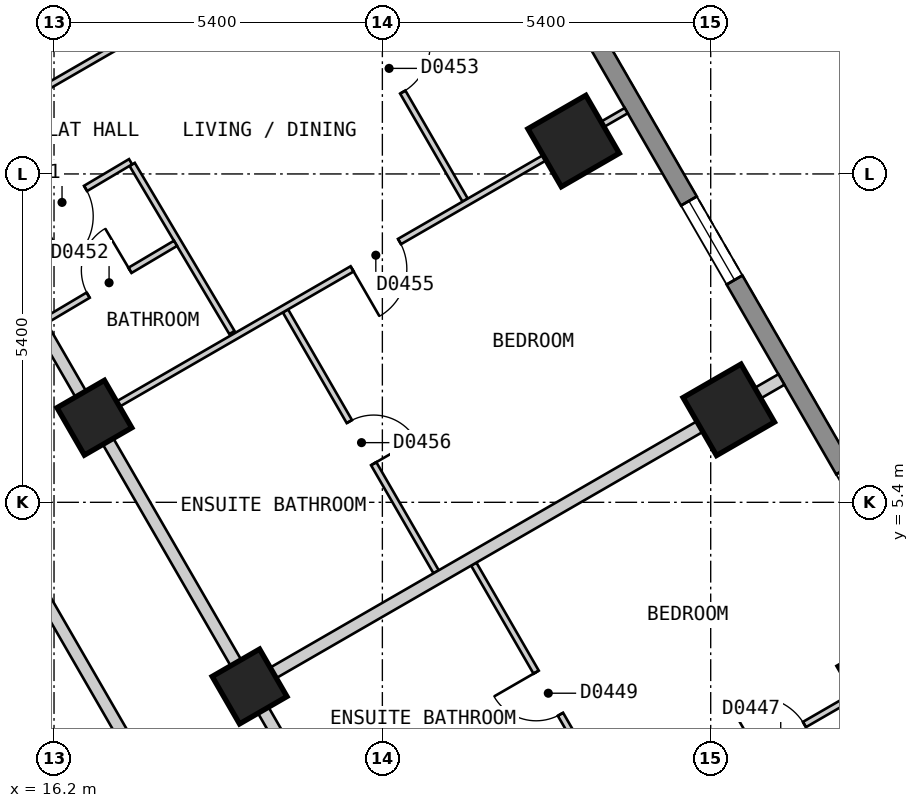
"""IFC4 building model, lengths in metres.
Left out: names, types, materials, properties, quantities, classifications, styles, units other than length and angle.
Written with IfcOpenShell. Run it as: python <this file> out.ifc"""

import sys

from ifc_helpers import new_model, si_unit, direction, frame, frame_2d, origin, origin_2d, place, context, subcontext, project, spatial, polyline, rectangle, outline, extrude, element, fill, save


model = new_model("IFC4")
c1 = context("Model", 3, precision=1e-05, world=origin(), true_north=direction((0.0, 1.0)))
c2 = subcontext(c1, "Body", "Model", "MODEL_VIEW")
j1 = project(units=[si_unit("LENGTHUNIT", "METRE"), si_unit("PLANEANGLEUNIT", "RADIAN")], contexts=[c1])
p1 = place(None, origin())
s1 = spatial("IfcSite", under=j1, at=p1, CompositionType="ELEMENT")
p2 = place(p1, origin())
s2 = spatial("IfcBuilding", under=s1, at=p2, CompositionType="ELEMENT")
p3 = place(p2, frame((0.0, 0.0, 38.4)))
s3 = spatial("IfcBuildingStorey", under=s2, at=p3, CompositionType="ELEMENT", Elevation=38.4)
for number, where, z_axis, x_axis in (
    (1, (29.848, 2.5, 0.0), (0.0, 0.0, 1.0), (-0.5, 0.866, 0.0)),
    (2, (27.297, 6.921, 0.0), (0.0, 0.0, 1.0), (-0.5, 0.866, 0.0)),
    (3, (24.745, 11.341, 0.0), (0.0, 0.0, 1.0), (-0.5, 0.866, 0.0)),
):
    element("IfcColumn", number, at=place(p3, frame(where, z_axis=z_axis, x_axis=x_axis)), inside=s3, PredefinedType="COLUMN", context=c2, shape_type="SweptSolid", body=[
        extrude(rectangle(XDim=1.1, YDim=1.1, at=origin_2d()), origin(), (0.0, 0.0, 1.0), 3.0),
    ])
for number, where, z_axis, x_axis in (
    (4, (19.416, 2.371, 0.0), (0.0, 0.0, 1.0), (-0.5, 0.866, 0.0)),
    (5, (16.864, 6.791, 0.0), (0.0, 0.0, 1.0), (-0.5, 0.866, 0.0)),
):
    element("IfcColumn", number, at=place(p3, frame(where, z_axis=z_axis, x_axis=x_axis)), inside=s3, PredefinedType="COLUMN", context=c2, shape_type="SweptSolid", body=[
        extrude(rectangle(XDim=0.9, YDim=0.9, at=origin_2d()), origin(), (0.0, 0.0, 1.0), 3.0),
    ])
p4 = place(p3, frame((31.22, 2.425, 0.0), z_axis=(0.0, 0.0, 1.0), x_axis=(-0.500001938803, 0.866024284413, 0.0)))
e6 = element("IfcWall", 6, at=p4, inside=s3, PredefinedType="SOLIDWALL", context=c2, shape_type="SweptSolid", body=[
    extrude(outline(polyline([(0.0, -0.15), (27.02, -0.15), (26.94, 0.15), (0.08, 0.15), (0.0, -0.15)])), origin(), (0.0, 0.0, 1.0), 2.7),
])
p5 = place(p4, frame((2.553, 0.0, 0.15)))
e7 = element("IfcOpeningElement", 7, at=p5, cuts=e6, PredefinedType="OPENING", context=c2, shape_type="SweptSolid", body=[
    extrude(rectangle(XDim=1.5, YDim=2.1, at=frame_2d((0.75, 1.05))), frame((0.0, 0.16, 0.0), z_axis=(0.0, -1.0, 0.0), x_axis=(1.0, 0.0, 0.0)), (0.0, 0.0, 1.0), 0.32),
])
p6 = place(p4, frame((7.657, 0.0, 0.15)))
e8 = element("IfcOpeningElement", 8, at=p6, cuts=e6, PredefinedType="OPENING", context=c2, shape_type="SweptSolid", body=[
    extrude(rectangle(XDim=1.5, YDim=2.1, at=frame_2d((0.75, 1.05))), frame((0.0, 0.16, 0.0), z_axis=(0.0, -1.0, 0.0), x_axis=(1.0, 0.0, 0.0)), (0.0, 0.0, 1.0), 0.32),
])
p7 = place(p4, frame((12.761, 0.0, 0.15)))
e9 = element("IfcOpeningElement", 9, at=p7, cuts=e6, PredefinedType="OPENING", context=c2, shape_type="SweptSolid", body=[
    extrude(rectangle(XDim=1.5, YDim=2.1, at=frame_2d((0.75, 1.05))), frame((0.0, 0.16, 0.0), z_axis=(0.0, -1.0, 0.0), x_axis=(1.0, 0.0, 0.0)), (0.0, 0.0, 1.0), 0.32),
])
p8 = place(p4, frame((17.865, 0.0, 0.15)))
e10 = element("IfcOpeningElement", 10, at=p8, cuts=e6, PredefinedType="OPENING", context=c2, shape_type="SweptSolid", body=[
    extrude(rectangle(XDim=1.5, YDim=2.1, at=frame_2d((0.75, 1.05))), frame((0.0, 0.16, 0.0), z_axis=(0.0, -1.0, 0.0), x_axis=(1.0, 0.0, 0.0)), (0.0, 0.0, 1.0), 0.32),
])
p9 = place(p4, frame((22.969, 0.0, 0.15)))
e11 = element("IfcOpeningElement", 11, at=p9, cuts=e6, PredefinedType="OPENING", context=c2, shape_type="SweptSolid", body=[
    extrude(rectangle(XDim=1.5, YDim=2.1, at=frame_2d((0.75, 1.05))), frame((0.0, 0.16, 0.0), z_axis=(0.0, -1.0, 0.0), x_axis=(1.0, 0.0, 0.0)), (0.0, 0.0, 1.0), 0.32),
])
p10 = place(p3, frame((9.18, 15.7, 0.0), z_axis=(0.0, 0.0, 1.0), x_axis=(0.500003652032, -0.866023295272, 0.0)))
e12 = element("IfcWall", 12, at=p10, inside=s3, PredefinedType="PARTITIONING", context=c2, shape_type="SweptSolid", body=[
    extrude(rectangle(XDim=18.012, YDim=0.2, at=frame_2d((9.006, 0.0))), origin(), (0.0, 0.0, 1.0), 2.7),
])
p11 = place(p10, frame((8.556, 0.0, 0.0)))
e13 = element("IfcOpeningElement", 13, at=p11, cuts=e12, PredefinedType="OPENING", context=c2, shape_type="SweptSolid", body=[
    extrude(rectangle(XDim=0.9, YDim=2.1, at=frame_2d((0.45, 1.05))), frame((0.0, 0.11, 0.0), z_axis=(0.0, -1.0, 0.0), x_axis=(1.0, 0.0, 0.0)), (0.0, 0.0, 1.0), 0.22),
])
p12 = place(p3, frame((10.45, 17.9, 0.0), z_axis=(0.0, 0.0, 1.0), x_axis=(0.500034352617, -0.866005569383, 0.0)))
e14 = element("IfcWall", 14, at=p12, inside=s3, PredefinedType="PARTITIONING", context=c2, shape_type="SweptSolid", body=[
    extrude(rectangle(XDim=20.553, YDim=0.2, at=frame_2d((10.276, 0.0))), origin(), (0.0, 0.0, 1.0), 2.7),
])
p13 = place(p12, frame((9.775, 0.0, 0.0)))
e15 = element("IfcOpeningElement", 15, at=p13, cuts=e14, PredefinedType="OPENING", context=c2, shape_type="SweptSolid", body=[
    extrude(rectangle(XDim=1.0, YDim=2.1, at=frame_2d((0.5, 1.05))), frame((0.0, 0.11, 0.0), z_axis=(0.0, -1.0, 0.0), x_axis=(1.0, 0.0, 0.0)), (0.0, 0.0, 1.0), 0.22),
])
p14 = place(p12, frame((0.852, 0.0, 0.0)))
e16 = element("IfcOpeningElement", 16, at=p14, cuts=e14, PredefinedType="OPENING", context=c2, shape_type="SweptSolid", body=[
    extrude(rectangle(XDim=0.8, YDim=2.1, at=frame_2d((0.4, 1.05))), frame((0.0, 0.11, 0.0), z_axis=(0.0, -1.0, 0.0), x_axis=(1.0, 0.0, 0.0)), (0.0, 0.0, 1.0), 0.22),
])
p15 = place(p3, frame((17.485, 10.957, 0.0), z_axis=(0.0, 0.0, 1.0), x_axis=(0.510324709283, -0.859981796956, 0.0)))
e17 = element("IfcWall", 17, at=p15, inside=s3, PredefinedType="PARTITIONING", context=c2, shape_type="SweptSolid", body=[
    extrude(rectangle(XDim=3.215, YDim=0.1, at=frame_2d((1.608, 0.0))), origin(), (0.0, 0.0, 1.0), 2.7),
])
p16 = place(p3, frame((20.006, 8.548, 0.0), z_axis=(0.0, 0.0, 1.0), x_axis=(0.500055121407, -0.865993577086, 0.0)))
e18 = element("IfcWall", 18, at=p16, inside=s3, PredefinedType="PARTITIONING", context=c2, shape_type="SweptSolid", body=[
    extrude(rectangle(XDim=4.955, YDim=0.1, at=frame_2d((2.478, 0.0))), origin(), (0.0, 0.0, 1.0), 2.7),
])
p17 = place(p16, frame((2.102, 0.0, 0.0)))
e19 = element("IfcOpeningElement", 19, at=p17, cuts=e18, PredefinedType="OPENING", context=c2, shape_type="SweptSolid", body=[
    extrude(rectangle(XDim=0.8, YDim=2.1, at=frame_2d((0.4, 1.05))), frame((0.0, 0.06, 0.0), z_axis=(0.0, -1.0, 0.0), x_axis=(1.0, 0.0, 0.0)), (0.0, 0.0, 1.0), 0.12),
])
p18 = place(p3, frame((23.103, 4.384, 0.0), z_axis=(0.0, 0.0, 1.0), x_axis=(0.500029609304, -0.86600830817, 0.0)))
e20 = element("IfcWall", 20, at=p18, inside=s3, PredefinedType="PARTITIONING", context=c2, shape_type="SweptSolid", body=[
    extrude(rectangle(XDim=4.954, YDim=0.1, at=frame_2d((2.477, 0.0))), origin(), (0.0, 0.0, 1.0), 2.7),
])
p19 = place(p18, frame((2.052, 0.0, 0.0)))
e21 = element("IfcOpeningElement", 21, at=p19, cuts=e20, PredefinedType="OPENING", context=c2, shape_type="SweptSolid", body=[
    extrude(rectangle(XDim=0.8, YDim=2.1, at=frame_2d((0.4, 1.05))), frame((0.0, 0.06, 0.0), z_axis=(0.0, -1.0, 0.0), x_axis=(1.0, 0.0, 0.0)), (0.0, 0.0, 1.0), 0.12),
])
p20 = place(p3, frame((20.46, 14.703, 0.0), z_axis=(0.0, 0.0, 1.0), x_axis=(0.499918186652, -0.866072633591, 0.0)))
e22 = element("IfcWall", 22, at=p20, inside=s3, PredefinedType="PARTITIONING", context=c2, shape_type="SweptSolid", body=[
    extrude(rectangle(XDim=5.003, YDim=0.1, at=frame_2d((2.501, 0.0))), origin(), (0.0, 0.0, 1.0), 2.7),
])
p21 = place(p20, frame((2.052, 0.0, 0.0)))
e23 = element("IfcOpeningElement", 23, at=p21, cuts=e22, PredefinedType="OPENING", context=c2, shape_type="SweptSolid", body=[
    extrude(rectangle(XDim=0.9, YDim=2.1, at=frame_2d((0.45, 1.05))), frame((0.0, 0.06, 0.0), z_axis=(0.0, -1.0, 0.0), x_axis=(1.0, 0.0, 0.0)), (0.0, 0.0, 1.0), 0.12),
])
p22 = place(p3, frame((25.588, 0.041, 0.0), z_axis=(0.0, 0.0, 1.0), x_axis=(0.866113484451, 0.499847408768, 0.0)))
e24 = element("IfcWall", 24, at=p22, inside=s3, PredefinedType="PARTITIONING", context=c2, shape_type="SweptSolid", body=[
    extrude(rectangle(XDim=5.92, YDim=0.1, at=frame_2d((2.96, 0.0))), origin(), (0.0, 0.0, 1.0), 2.7),
])
p23 = place(p22, frame((2.51, 0.0, 0.0)))
e25 = element("IfcOpeningElement", 25, at=p23, cuts=e24, PredefinedType="OPENING", context=c2, shape_type="SweptSolid", body=[
    extrude(rectangle(XDim=0.9, YDim=2.1, at=frame_2d((0.45, 1.05))), frame((0.0, 0.06, 0.0), z_axis=(0.0, -1.0, 0.0), x_axis=(1.0, 0.0, 0.0)), (0.0, 0.0, 1.0), 0.12),
])
p24 = place(p3, frame((16.95, 6.841, 0.0), z_axis=(0.0, 0.0, 1.0), x_axis=(0.866022959057, 0.500004234368, 0.0)))
e26 = element("IfcWall", 26, at=p24, inside=s3, PredefinedType="PARTITIONING", context=c2, shape_type="SweptSolid", body=[
    extrude(rectangle(XDim=10.0, YDim=0.1, at=frame_2d((5.0, 0.0))), origin(), (0.0, 0.0, 1.0), 2.7),
])
p25 = place(p24, frame((4.795, 0.0, 0.0)))
e27 = element("IfcOpeningElement", 27, at=p25, cuts=e26, PredefinedType="OPENING", context=c2, shape_type="SweptSolid", body=[
    extrude(rectangle(XDim=0.9, YDim=2.1, at=frame_2d((0.45, 1.05))), frame((0.0, 0.06, 0.0), z_axis=(0.0, -1.0, 0.0), x_axis=(1.0, 0.0, 0.0)), (0.0, 0.0, 1.0), 0.12),
])
p26 = place(p3, frame((14.399, 11.261, 0.0), z_axis=(0.0, 0.0, 1.0), x_axis=(0.866022959057, 0.500004234368, 0.0)))
e28 = element("IfcWall", 28, at=p26, inside=s3, PredefinedType="PARTITIONING", context=c2, shape_type="SweptSolid", body=[
    extrude(rectangle(XDim=10.0, YDim=0.1, at=frame_2d((5.0, 0.0))), origin(), (0.0, 0.0, 1.0), 2.7),
])
p27 = place(p26, frame((4.775, 0.0, 0.0)))
e29 = element("IfcOpeningElement", 29, at=p27, cuts=e28, PredefinedType="OPENING", context=c2, shape_type="SweptSolid", body=[
    extrude(rectangle(XDim=0.9, YDim=2.1, at=frame_2d((0.45, 1.05))), frame((0.0, 0.06, 0.0), z_axis=(0.0, -1.0, 0.0), x_axis=(1.0, 0.0, 0.0)), (0.0, 0.0, 1.0), 0.12),
])
p28 = place(p3, frame((16.057, 8.389, 0.0), z_axis=(0.0, 0.0, 1.0), x_axis=(0.860077993161, 0.510162567893, 0.0)))
e30 = element("IfcWall", 30, at=p28, inside=s3, PredefinedType="PARTITIONING", context=c2, shape_type="SweptSolid", body=[
    extrude(rectangle(XDim=2.49, YDim=0.1, at=frame_2d((1.245, 0.0))), origin(), (0.0, 0.0, 1.0), 2.7),
])
p29 = place(p28, frame((0.819, 0.0, 0.0)))
e31 = element("IfcOpeningElement", 31, at=p29, cuts=e30, PredefinedType="OPENING", context=c2, shape_type="SweptSolid", body=[
    extrude(rectangle(XDim=0.8, YDim=2.1, at=frame_2d((0.4, 1.05))), frame((0.0, 0.06, 0.0), z_axis=(0.0, -1.0, 0.0), x_axis=(1.0, 0.0, 0.0)), (0.0, 0.0, 1.0), 0.12),
])
p30 = place(p3, frame((15.291, 9.715, 0.0), z_axis=(0.0, 0.0, 1.0), x_axis=(0.860088508644, 0.51014483953, 0.0)))
e32 = element("IfcWall", 32, at=p30, inside=s3, PredefinedType="PARTITIONING", context=c2, shape_type="SweptSolid", body=[
    extrude(rectangle(XDim=2.521, YDim=0.1, at=frame_2d((1.26, 0.0))), origin(), (0.0, 0.0, 1.0), 2.7),
])
p31 = place(p30, frame((0.76, 0.0, 0.0)))
e33 = element("IfcOpeningElement", 33, at=p31, cuts=e32, PredefinedType="OPENING", context=c2, shape_type="SweptSolid", body=[
    extrude(rectangle(XDim=0.9, YDim=2.1, at=frame_2d((0.45, 1.05))), frame((0.0, 0.06, 0.0), z_axis=(0.0, -1.0, 0.0), x_axis=(1.0, 0.0, 0.0)), (0.0, 0.0, 1.0), 0.12),
])
p32 = place(p3, frame((19.503, 2.421, 0.0), z_axis=(0.0, 0.0, 1.0), x_axis=(0.866065245018, 0.499930986609, 0.0)))
e34 = element("IfcWall", 34, at=p32, inside=s3, PredefinedType="PARTITIONING", context=c2, shape_type="SweptSolid", body=[
    extrude(rectangle(XDim=10.0, YDim=0.2, at=frame_2d((5.0, 0.0))), origin(), (0.0, 0.0, 1.0), 2.7),
])
p33 = place(p6, origin())
e35 = element("IfcWindow", 35, at=p33, inside=s3, PartitioningType="SINGLE_PANEL", PredefinedType="WINDOW", context=c2, shape_type="SweptSolid", body=[
    extrude(rectangle(XDim=1.5, YDim=2.1, at=frame_2d((0.75, 1.05))), frame((0.0, 0.03, 0.0), z_axis=(0.0, -1.0, 0.0), x_axis=(1.0, 0.0, 0.0)), (0.0, 0.0, 1.0), 0.06),
])
fill(e8, e35)
p34 = place(p23, origin())
e36 = element("IfcDoor", 36, at=p34, inside=s3, OperationType="SINGLE_SWING_LEFT", PredefinedType="DOOR", context=c2, shape_type="SweptSolid", body=[
    extrude(rectangle(XDim=0.9, YDim=2.1, at=frame_2d((0.45, 1.05))), frame((0.0, 0.025, 0.0), z_axis=(0.0, -1.0, 0.0), x_axis=(1.0, 0.0, 0.0)), (0.0, 0.0, 1.0), 0.05),
])
fill(e25, e36)
p35 = place(p19, origin())
e37 = element("IfcDoor", 37, at=p35, inside=s3, OperationType="SINGLE_SWING_LEFT", PredefinedType="DOOR", context=c2, shape_type="SweptSolid", body=[
    extrude(rectangle(XDim=0.8, YDim=2.1, at=frame_2d((0.4, 1.05))), frame((0.0, 0.025, 0.0), z_axis=(0.0, -1.0, 0.0), x_axis=(1.0, 0.0, 0.0)), (0.0, 0.0, 1.0), 0.05),
])
fill(e21, e37)
p36 = place(p31, origin())
e38 = element("IfcDoor", 38, at=p36, inside=s3, OperationType="SINGLE_SWING_LEFT", PredefinedType="DOOR", context=c2, shape_type="SweptSolid", body=[
    extrude(rectangle(XDim=0.9, YDim=2.1, at=frame_2d((0.45, 1.05))), frame((0.0, 0.025, 0.0), z_axis=(0.0, -1.0, 0.0), x_axis=(1.0, 0.0, 0.0)), (0.0, 0.0, 1.0), 0.05),
])
fill(e33, e38)
p37 = place(p29, origin())
e39 = element("IfcDoor", 39, at=p37, inside=s3, OperationType="SINGLE_SWING_RIGHT", PredefinedType="DOOR", context=c2, shape_type="SweptSolid", body=[
    extrude(rectangle(XDim=0.8, YDim=2.1, at=frame_2d((0.4, 1.05))), frame((0.0, 0.025, 0.0), z_axis=(0.0, -1.0, 0.0), x_axis=(1.0, 0.0, 0.0)), (0.0, 0.0, 1.0), 0.05),
])
fill(e31, e39)
p38 = place(p21, origin())
e40 = element("IfcDoor", 40, at=p38, inside=s3, OperationType="SINGLE_SWING_LEFT", PredefinedType="DOOR", context=c2, shape_type="SweptSolid", body=[
    extrude(rectangle(XDim=0.9, YDim=2.1, at=frame_2d((0.45, 1.05))), frame((0.0, 0.025, 0.0), z_axis=(0.0, -1.0, 0.0), x_axis=(1.0, 0.0, 0.0)), (0.0, 0.0, 1.0), 0.05),
])
fill(e23, e40)
p39 = place(p25, origin())
e41 = element("IfcDoor", 41, at=p39, inside=s3, OperationType="SINGLE_SWING_LEFT", PredefinedType="DOOR", context=c2, shape_type="SweptSolid", body=[
    extrude(rectangle(XDim=0.9, YDim=2.1, at=frame_2d((0.45, 1.05))), frame((0.0, 0.025, 0.0), z_axis=(0.0, -1.0, 0.0), x_axis=(1.0, 0.0, 0.0)), (0.0, 0.0, 1.0), 0.05),
])
fill(e27, e41)
p40 = place(p17, origin())
e42 = element("IfcDoor", 42, at=p40, inside=s3, OperationType="SINGLE_SWING_RIGHT", PredefinedType="DOOR", context=c2, shape_type="SweptSolid", body=[
    extrude(rectangle(XDim=0.8, YDim=2.1, at=frame_2d((0.4, 1.05))), frame((0.0, 0.025, 0.0), z_axis=(0.0, -1.0, 0.0), x_axis=(1.0, 0.0, 0.0)), (0.0, 0.0, 1.0), 0.05),
])
fill(e19, e42)
save(model, sys.argv[1])
